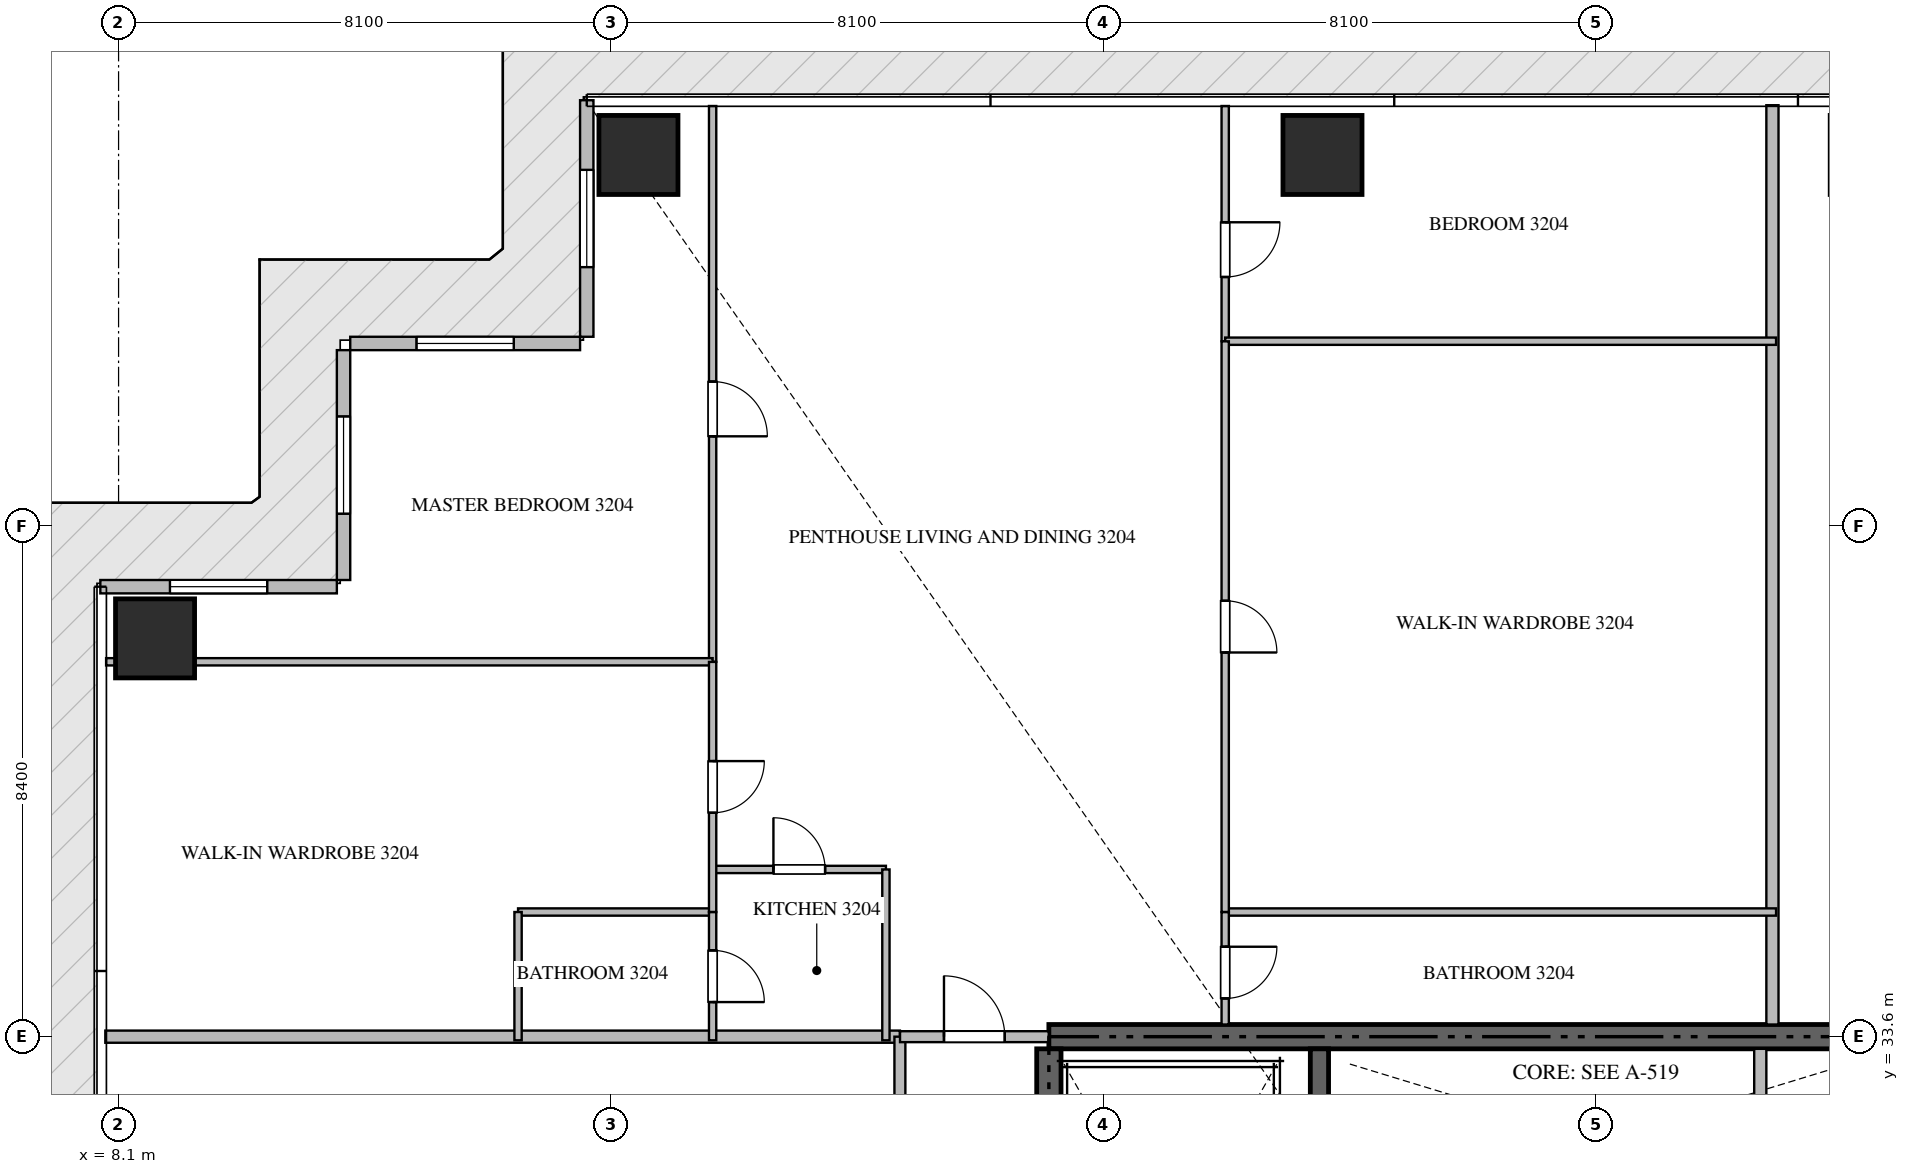
"""IFC4 building model, lengths in metres.
Left out: names, types, materials, properties, quantities, classifications, styles, units other than length and angle.
Written with IfcOpenShell. Run it as: python <this file> out.ifc"""

import sys

from ifc_helpers import new_model, si_unit, direction, frame, frame_2d, origin, origin_2d, place, context, subcontext, project, spatial, rectangle, extrude, source, transform, mapped, element, fill, save


model = new_model("IFC4")
c1 = context("Model", 3, precision=1e-05, world=origin(), true_north=direction((0.0, 1.0)))
c2 = subcontext(c1, "Body", "Model", "MODEL_VIEW")
j1 = project(units=[si_unit("LENGTHUNIT", "METRE"), si_unit("PLANEANGLEUNIT", "RADIAN")], contexts=[c1])
p1 = place(None, origin())
s1 = spatial("IfcSite", under=j1, at=p1, CompositionType="ELEMENT")
p2 = place(p1, origin())
s2 = spatial("IfcBuilding", under=s1, at=p2, CompositionType="ELEMENT")
p3 = place(p2, frame((0.0, 0.0, 131.4)))
s3 = spatial("IfcBuildingStorey", under=s2, at=p3, CompositionType="ELEMENT", Elevation=131.4)
p4 = place(p3, frame((41.4, 33.6, -0.26), z_axis=(0.0, 0.0, 1.0), x_axis=(-1.0, 0.0, 0.0)))
e1 = element("IfcWall", 1, at=p4, inside=s3, PredefinedType="SHEAR", context=c2, shape_type="SweptSolid", body=[
    extrude(rectangle(XDim=18.0, YDim=0.4, at=frame_2d((9.0, 0.0))), origin(), (0.0, 0.0, 1.0), 3.748),
])
p5 = place(p3, frame((23.4, 24.25, -0.26), z_axis=(0.0, 0.0, 1.0), x_axis=(0.0, 1.0, 0.0)))
e2 = element("IfcWall", 2, at=p5, inside=s3, PredefinedType="SHEAR", context=c2, shape_type="SweptSolid", body=[
    extrude(rectangle(XDim=9.15, YDim=0.4, at=frame_2d((4.575, 0.0))), origin(), (0.0, 0.0, 1.0), 3.748),
])
p6 = place(p3, frame((27.85, 23.55, -0.26), z_axis=(0.0, 0.0, 1.0), x_axis=(0.0, 1.0, 0.0)))
e3 = element("IfcWall", 3, at=p6, inside=s3, PredefinedType="SHEAR", context=c2, shape_type="SweptSolid", body=[
    extrude(rectangle(XDim=9.85, YDim=0.3, at=frame_2d((4.925, 0.0))), origin(), (0.0, 0.0, 1.0), 3.748),
])
m1 = source(origin(), c2, "Body", "SweptSolid", [
    extrude(rectangle(XDim=1.3, YDim=1.3, at=origin_2d()), origin(), (0.0, 0.0, 1.0), 3.75),
])
for number, where, z_axis, x_axis in (
    (4, (16.65, 48.1, -0.26), (0.0, 0.0, 1.0), (1.0, 0.0, 0.0)),
    (5, (27.9, 48.1, -0.26), (0.0, 0.0, 1.0), (1.0, 0.0, 0.0)),
    (6, (8.7, 40.15, -0.26), (0.0, 0.0, 1.0), (1.0, 0.0, 0.0)),
):
    element("IfcColumn", number, at=place(p3, frame(where, z_axis=z_axis, x_axis=x_axis)), inside=s3, PredefinedType="COLUMN", context=c2, shape_type="MappedRepresentation", body=[
        mapped(m1, transform((0.0, 0.0, 0.0), scale=1.0)),
    ])
p7 = place(p3, frame((15.8, 49.0, 0.0), z_axis=(0.0, 0.0, 1.0), x_axis=(0.0, -1.0, 0.0)))
e7 = element("IfcWall", 7, at=p7, inside=s3, PredefinedType="ELEMENTEDWALL", context=c2, shape_type="SweptSolid", body=[
    extrude(rectangle(XDim=3.89, YDim=0.22, at=frame_2d((1.945, 0.0))), origin(), (0.0, 0.0, 1.0), 3.475),
])
p8 = place(p7, frame((1.145, 0.0, 0.65)))
e8 = element("IfcOpeningElement", 8, at=p8, cuts=e7, PredefinedType="OPENING", context=c2, shape_type="SweptSolid", body=[
    extrude(rectangle(XDim=1.6, YDim=2.1, at=frame_2d((0.8, 1.05))), frame((0.0, 0.12, 0.0), z_axis=(0.0, -1.0, 0.0), x_axis=(1.0, 0.0, 0.0)), (0.0, 0.0, 1.0), 0.24),
])
p9 = place(p3, frame((15.69, 45.0, 0.0), z_axis=(0.0, 0.0, 1.0), x_axis=(-1.0, 0.0, 0.0)))
e9 = element("IfcWall", 9, at=p9, inside=s3, PredefinedType="ELEMENTEDWALL", context=c2, shape_type="SweptSolid", body=[
    extrude(rectangle(XDim=3.78, YDim=0.22, at=frame_2d((1.89, 0.0))), origin(), (0.0, 0.0, 1.0), 3.475),
])
p10 = place(p9, frame((1.09, 0.0, 0.65)))
e10 = element("IfcOpeningElement", 10, at=p10, cuts=e9, PredefinedType="OPENING", context=c2, shape_type="SweptSolid", body=[
    extrude(rectangle(XDim=1.6, YDim=2.1, at=frame_2d((0.8, 1.05))), frame((0.0, 0.12, 0.0), z_axis=(0.0, -1.0, 0.0), x_axis=(1.0, 0.0, 0.0)), (0.0, 0.0, 1.0), 0.24),
])
p11 = place(p3, frame((11.8, 44.89, 0.0), z_axis=(0.0, 0.0, 1.0), x_axis=(0.0, -1.0, 0.0)))
e11 = element("IfcWall", 11, at=p11, inside=s3, PredefinedType="ELEMENTEDWALL", context=c2, shape_type="SweptSolid", body=[
    extrude(rectangle(XDim=3.78, YDim=0.22, at=frame_2d((1.89, 0.0))), origin(), (0.0, 0.0, 1.0), 3.475),
])
p12 = place(p11, frame((1.09, 0.0, 0.65)))
e12 = element("IfcOpeningElement", 12, at=p12, cuts=e11, PredefinedType="OPENING", context=c2, shape_type="SweptSolid", body=[
    extrude(rectangle(XDim=1.6, YDim=2.1, at=frame_2d((0.8, 1.05))), frame((0.0, 0.12, 0.0), z_axis=(0.0, -1.0, 0.0), x_axis=(1.0, 0.0, 0.0)), (0.0, 0.0, 1.0), 0.24),
])
p13 = place(p3, frame((11.69, 41.0, 0.0), z_axis=(0.0, 0.0, 1.0), x_axis=(-1.0, 0.0, 0.0)))
e13 = element("IfcWall", 13, at=p13, inside=s3, PredefinedType="ELEMENTEDWALL", context=c2, shape_type="SweptSolid", body=[
    extrude(rectangle(XDim=3.89, YDim=0.22, at=frame_2d((1.945, 0.0))), origin(), (0.0, 0.0, 1.0), 3.475),
])
p14 = place(p13, frame((1.145, 0.0, 0.65)))
e14 = element("IfcOpeningElement", 14, at=p14, cuts=e13, PredefinedType="OPENING", context=c2, shape_type="SweptSolid", body=[
    extrude(rectangle(XDim=1.6, YDim=2.1, at=frame_2d((0.8, 1.05))), frame((0.0, 0.12, 0.0), z_axis=(0.0, -1.0, 0.0), x_axis=(1.0, 0.0, 0.0)), (0.0, 0.0, 1.0), 0.24),
])
p15 = place(p3, frame((35.1, 30.75, 0.0), z_axis=(0.0, 0.0, 1.0), x_axis=(0.0, 1.0, 0.0)))
e15 = element("IfcWall", 15, at=p15, inside=s3, PredefinedType="STANDARD", context=c2, shape_type="SweptSolid", body=[
    extrude(rectangle(XDim=2.65, YDim=0.2, at=frame_2d((1.325, 0.0))), origin(), (0.0, 0.0, 1.0), 3.49),
])
p16 = place(p3, frame((35.3, 33.8, 0.0), z_axis=(0.0, 0.0, 1.0), x_axis=(0.0, 1.0, 0.0)))
e16 = element("IfcWall", 16, at=p16, inside=s3, PredefinedType="PARTITIONING", context=c2, shape_type="SweptSolid", body=[
    extrude(rectangle(XDim=15.118, YDim=0.2, at=frame_2d((7.559, 0.0))), origin(), (0.0, 0.0, 1.0), 3.49),
])
p17 = place(p3, frame((7.882, 33.6, 0.0), z_axis=(0.0, 0.0, 1.0), x_axis=(1.0, 0.0, 0.0)))
e17 = element("IfcWall", 17, at=p17, inside=s3, PredefinedType="PARTITIONING", context=c2, shape_type="SweptSolid", body=[
    extrude(rectangle(XDim=13.068, YDim=0.2, at=frame_2d((6.534, 0.0))), origin(), (0.0, 0.0, 1.0), 3.49),
])
p18 = place(p3, frame((20.95, 14.9, 0.0), z_axis=(0.0, 0.0, 1.0), x_axis=(0.0, 1.0, 0.0)))
e18 = element("IfcWall", 18, at=p18, inside=s3, PredefinedType="PARTITIONING", context=c2, shape_type="SweptSolid", body=[
    extrude(rectangle(XDim=18.7, YDim=0.18, at=frame_2d((9.35, 0.0))), origin(), (0.0, 0.0, 1.0), 3.49),
])
p19 = place(p18, frame((1.805, 0.0, 0.0)))
e19 = element("IfcOpeningElement", 19, at=p19, cuts=e18, PredefinedType="OPENING", context=c2, shape_type="SweptSolid", body=[
    extrude(rectangle(XDim=1.0, YDim=2.15, at=frame_2d((0.5, 1.075))), frame((0.0, 0.1, 0.0), z_axis=(0.0, -1.0, 0.0), x_axis=(1.0, 0.0, 0.0)), (0.0, 0.0, 1.0), 0.2),
])
p20 = place(p18, frame((14.726, 0.0, 0.0)))
e20 = element("IfcOpeningElement", 20, at=p20, cuts=e18, PredefinedType="OPENING", context=c2, shape_type="SweptSolid", body=[
    extrude(rectangle(XDim=1.0, YDim=2.15, at=frame_2d((0.5, 1.075))), frame((0.0, 0.1, 0.0), z_axis=(0.0, -1.0, 0.0), x_axis=(1.0, 0.0, 0.0)), (0.0, 0.0, 1.0), 0.2),
])
p21 = place(p3, frame((20.952, 33.6, 0.0), z_axis=(0.0, 0.0, 1.0), x_axis=(1.0, 0.0, 0.0)))
e21 = element("IfcWall", 21, at=p21, inside=s3, PredefinedType="PARTITIONING", context=c2, shape_type="SweptSolid", body=[
    extrude(rectangle(XDim=2.446, YDim=0.18, at=frame_2d((1.223, 0.0))), origin(), (0.0, 0.0, 1.0), 3.49),
])
p22 = place(p21, frame((0.723, 0.0, 0.0)))
e22 = element("IfcOpeningElement", 22, at=p22, cuts=e21, PredefinedType="OPENING", context=c2, shape_type="SweptSolid", body=[
    extrude(rectangle(XDim=1.0, YDim=2.15, at=frame_2d((0.5, 1.075))), frame((0.0, 0.1, 0.0), z_axis=(0.0, -1.0, 0.0), x_axis=(1.0, 0.0, 0.0)), (0.0, 0.0, 1.0), 0.2),
])
p23 = place(p3, frame((17.87, 36.35, 0.0), z_axis=(0.0, 0.0, 1.0), x_axis=(1.0, 0.0, 0.0)))
e23 = element("IfcWall", 23, at=p23, inside=s3, PredefinedType="PARTITIONING", context=c2, shape_type="SweptSolid", body=[
    extrude(rectangle(XDim=2.85, YDim=0.12, at=frame_2d((1.425, 0.0))), origin(), (0.0, 0.0, 1.0), 3.49),
])
p24 = place(p23, frame((1.0, 0.0, 0.0)))
e24 = element("IfcOpeningElement", 24, at=p24, cuts=e23, PredefinedType="OPENING", context=c2, shape_type="SweptSolid", body=[
    extrude(rectangle(XDim=0.85, YDim=2.1, at=frame_2d((0.425, 1.05))), frame((0.0, 0.07, 0.0), z_axis=(0.0, -1.0, 0.0), x_axis=(1.0, 0.0, 0.0)), (0.0, 0.0, 1.0), 0.14),
])
p25 = place(p3, frame((20.72, 36.35, 0.0), z_axis=(0.0, 0.0, 1.0), x_axis=(0.0, -1.0, 0.0)))
e25 = element("IfcWall", 25, at=p25, inside=s3, PredefinedType="PARTITIONING", context=c2, shape_type="SweptSolid", body=[
    extrude(rectangle(XDim=2.81, YDim=0.12, at=frame_2d((1.405, 0.0))), origin(), (0.0, 0.0, 1.0), 3.49),
])
p26 = place(p3, frame((17.87, 48.905, 0.0), z_axis=(0.0, 0.0, 1.0), x_axis=(0.0, -1.0, 0.0)))
e26 = element("IfcWall", 26, at=p26, inside=s3, PredefinedType="PARTITIONING", context=c2, shape_type="SweptSolid", body=[
    extrude(rectangle(XDim=9.14, YDim=0.12, at=frame_2d((4.57, 0.0))), origin(), (0.0, 0.0, 1.0), 3.49),
])
p27 = place(p26, frame((4.532, 0.0, 0.0)))
e27 = element("IfcOpeningElement", 27, at=p27, cuts=e26, PredefinedType="OPENING", context=c2, shape_type="SweptSolid", body=[
    extrude(rectangle(XDim=0.9, YDim=2.1, at=frame_2d((0.45, 1.05))), frame((0.0, 0.07, 0.0), z_axis=(0.0, -1.0, 0.0), x_axis=(1.0, 0.0, 0.0)), (0.0, 0.0, 1.0), 0.14),
])
p28 = place(p3, frame((7.895, 39.765, 0.0), z_axis=(0.0, 0.0, 1.0), x_axis=(1.0, 0.0, 0.0)))
e28 = element("IfcWall", 28, at=p28, inside=s3, PredefinedType="PARTITIONING", context=c2, shape_type="SweptSolid", body=[
    extrude(rectangle(XDim=9.975, YDim=0.12, at=frame_2d((4.988, 0.0))), origin(), (0.0, 0.0, 1.0), 3.49),
])
p29 = place(p3, frame((14.67, 35.65, 0.0), z_axis=(0.0, 0.0, 1.0), x_axis=(1.0, 0.0, 0.0)))
e29 = element("IfcWall", 29, at=p29, inside=s3, PredefinedType="PARTITIONING", context=c2, shape_type="SweptSolid", body=[
    extrude(rectangle(XDim=3.2, YDim=0.12, at=frame_2d((1.6, 0.0))), origin(), (0.0, 0.0, 1.0), 3.49),
])
p30 = place(p3, frame((14.67, 35.65, 0.0), z_axis=(0.0, 0.0, 1.0), x_axis=(0.0, -1.0, 0.0)))
e30 = element("IfcWall", 30, at=p30, inside=s3, PredefinedType="PARTITIONING", context=c2, shape_type="SweptSolid", body=[
    extrude(rectangle(XDim=2.11, YDim=0.12, at=frame_2d((1.055, 0.0))), origin(), (0.0, 0.0, 1.0), 3.49),
])
p31 = place(p3, frame((17.87, 39.763, 0.0), z_axis=(0.0, 0.0, 1.0), x_axis=(0.0, -1.0, 0.0)))
e31 = element("IfcWall", 31, at=p31, inside=s3, PredefinedType="PARTITIONING", context=c2, shape_type="SweptSolid", body=[
    extrude(rectangle(XDim=4.113, YDim=0.12, at=frame_2d((2.057, 0.0))), origin(), (0.0, 0.0, 1.0), 3.49),
])
p32 = place(p31, frame((1.631, 0.0, 0.0)))
e32 = element("IfcOpeningElement", 32, at=p32, cuts=e31, PredefinedType="OPENING", context=c2, shape_type="SweptSolid", body=[
    extrude(rectangle(XDim=0.85, YDim=2.1, at=frame_2d((0.425, 1.05))), frame((0.0, 0.07, 0.0), z_axis=(0.0, -1.0, 0.0), x_axis=(1.0, 0.0, 0.0)), (0.0, 0.0, 1.0), 0.14),
])
p33 = place(p3, frame((17.87, 35.648, 0.0), z_axis=(0.0, 0.0, 1.0), x_axis=(0.0, -1.0, 0.0)))
e33 = element("IfcWall", 33, at=p33, inside=s3, PredefinedType="PARTITIONING", context=c2, shape_type="SweptSolid", body=[
    extrude(rectangle(XDim=2.108, YDim=0.12, at=frame_2d((1.054, 0.0))), origin(), (0.0, 0.0, 1.0), 3.49),
])
p34 = place(p33, frame((0.629, 0.0, 0.0)))
e34 = element("IfcOpeningElement", 34, at=p34, cuts=e33, PredefinedType="OPENING", context=c2, shape_type="SweptSolid", body=[
    extrude(rectangle(XDim=0.85, YDim=2.1, at=frame_2d((0.425, 1.05))), frame((0.0, 0.07, 0.0), z_axis=(0.0, -1.0, 0.0), x_axis=(1.0, 0.0, 0.0)), (0.0, 0.0, 1.0), 0.14),
])
p35 = place(p3, frame((26.3, 48.905, 0.0), z_axis=(0.0, 0.0, 1.0), x_axis=(0.0, -1.0, 0.0)))
e35 = element("IfcWall", 35, at=p35, inside=s3, PredefinedType="PARTITIONING", context=c2, shape_type="SweptSolid", body=[
    extrude(rectangle(XDim=3.868, YDim=0.12, at=frame_2d((1.934, 0.0))), origin(), (0.0, 0.0, 1.0), 3.49),
])
p36 = place(p35, frame((1.912, 0.0, 0.0)))
e36 = element("IfcOpeningElement", 36, at=p36, cuts=e35, PredefinedType="OPENING", context=c2, shape_type="SweptSolid", body=[
    extrude(rectangle(XDim=0.9, YDim=2.1, at=frame_2d((0.45, 1.05))), frame((0.0, 0.07, 0.0), z_axis=(0.0, -1.0, 0.0), x_axis=(1.0, 0.0, 0.0)), (0.0, 0.0, 1.0), 0.14),
])
for number, where, z_axis, x_axis in (
    (37, (26.3, 45.037, 0.0), (0.0, 0.0, 1.0), (1.0, 0.0, 0.0)),
    (38, (26.3, 35.65, 0.0), (0.0, 0.0, 1.0), (1.0, 0.0, 0.0)),
):
    element("IfcWall", number, at=place(p3, frame(where, z_axis=z_axis, x_axis=x_axis)), inside=s3, PredefinedType="PARTITIONING", context=c2, shape_type="SweptSolid", body=[
        extrude(rectangle(XDim=9.06, YDim=0.12, at=frame_2d((4.53, 0.0))), origin(), (0.0, 0.0, 1.0), 3.49),
    ])
p37 = place(p3, frame((26.3, 45.035, 0.0), z_axis=(0.0, 0.0, 1.0), x_axis=(0.0, -1.0, 0.0)))
e39 = element("IfcWall", 39, at=p37, inside=s3, PredefinedType="PARTITIONING", context=c2, shape_type="SweptSolid", body=[
    extrude(rectangle(XDim=9.385, YDim=0.12, at=frame_2d((4.692, 0.0))), origin(), (0.0, 0.0, 1.0), 3.49),
])
p38 = place(p37, frame((4.267, 0.0, 0.0)))
e40 = element("IfcOpeningElement", 40, at=p38, cuts=e39, PredefinedType="OPENING", context=c2, shape_type="SweptSolid", body=[
    extrude(rectangle(XDim=0.85, YDim=2.1, at=frame_2d((0.425, 1.05))), frame((0.0, 0.07, 0.0), z_axis=(0.0, -1.0, 0.0), x_axis=(1.0, 0.0, 0.0)), (0.0, 0.0, 1.0), 0.14),
])
p39 = place(p3, frame((26.3, 35.648, 0.0), z_axis=(0.0, 0.0, 1.0), x_axis=(0.0, -1.0, 0.0)))
e41 = element("IfcWall", 41, at=p39, inside=s3, PredefinedType="PARTITIONING", context=c2, shape_type="SweptSolid", body=[
    extrude(rectangle(XDim=1.848, YDim=0.12, at=frame_2d((0.924, 0.0))), origin(), (0.0, 0.0, 1.0), 3.49),
])
p40 = place(p39, frame((0.569, 0.0, 0.0)))
e42 = element("IfcOpeningElement", 42, at=p40, cuts=e41, PredefinedType="OPENING", context=c2, shape_type="SweptSolid", body=[
    extrude(rectangle(XDim=0.85, YDim=2.1, at=frame_2d((0.425, 1.05))), frame((0.0, 0.07, 0.0), z_axis=(0.0, -1.0, 0.0), x_axis=(1.0, 0.0, 0.0)), (0.0, 0.0, 1.0), 0.14),
])
m2 = source(origin(), c2, "Body", "SweptSolid", [
    extrude(rectangle(XDim=1.6, YDim=2.1, at=frame_2d((0.8, 1.05))), frame((0.0, 0.03, 0.0), z_axis=(0.0, -1.0, 0.0), x_axis=(1.0, 0.0, 0.0)), (0.0, 0.0, 1.0), 0.06),
])
p41 = place(p8, origin())
e43 = element("IfcWindow", 43, at=p41, inside=s3, PartitioningType="SINGLE_PANEL", PredefinedType="WINDOW", context=c2, shape_type="MappedRepresentation", body=[
    mapped(m2, transform((0.0, 0.0, 0.0), scale=1.0)),
])
fill(e8, e43)
p42 = place(p10, origin())
e44 = element("IfcWindow", 44, at=p42, inside=s3, PartitioningType="SINGLE_PANEL", PredefinedType="WINDOW", context=c2, shape_type="MappedRepresentation", body=[
    mapped(m2, transform((0.0, 0.0, 0.0), scale=1.0)),
])
fill(e10, e44)
p43 = place(p12, origin())
e45 = element("IfcWindow", 45, at=p43, inside=s3, PartitioningType="SINGLE_PANEL", PredefinedType="WINDOW", context=c2, shape_type="MappedRepresentation", body=[
    mapped(m2, transform((0.0, 0.0, 0.0), scale=1.0)),
])
fill(e12, e45)
p44 = place(p14, origin())
e46 = element("IfcWindow", 46, at=p44, inside=s3, PartitioningType="SINGLE_PANEL", PredefinedType="WINDOW", context=c2, shape_type="MappedRepresentation", body=[
    mapped(m2, transform((0.0, 0.0, 0.0), scale=1.0)),
])
fill(e14, e46)
m3 = source(origin(), c2, "Body", "SweptSolid", [
    extrude(rectangle(XDim=1.0, YDim=2.15, at=frame_2d((0.5, 1.075))), frame((0.0, 0.025, 0.0), z_axis=(0.0, -1.0, 0.0), x_axis=(1.0, 0.0, 0.0)), (0.0, 0.0, 1.0), 0.05),
])
p45 = place(p22, origin())
e47 = element("IfcDoor", 47, at=p45, inside=s3, OperationType="SINGLE_SWING_LEFT", PredefinedType="DOOR", context=c2, shape_type="MappedRepresentation", body=[
    mapped(m3, transform((0.0, 0.0, 0.0), scale=1.0)),
])
fill(e22, e47)
m4 = source(origin(), c2, "Body", "SweptSolid", [
    extrude(rectangle(XDim=0.85, YDim=2.1, at=frame_2d((0.425, 1.05))), frame((0.0, 0.025, 0.0), z_axis=(0.0, -1.0, 0.0), x_axis=(1.0, 0.0, 0.0)), (0.0, 0.0, 1.0), 0.05),
])
p46 = place(p24, origin())
e48 = element("IfcDoor", 48, at=p46, inside=s3, OperationType="SINGLE_SWING_LEFT", PredefinedType="DOOR", context=c2, shape_type="MappedRepresentation", body=[
    mapped(m4, transform((0.0, 0.0, 0.0), scale=1.0)),
])
fill(e24, e48)
m5 = source(origin(), c2, "Body", "SweptSolid", [
    extrude(rectangle(XDim=0.9, YDim=2.1, at=frame_2d((0.45, 1.05))), frame((0.0, 0.025, 0.0), z_axis=(0.0, -1.0, 0.0), x_axis=(1.0, 0.0, 0.0)), (0.0, 0.0, 1.0), 0.05),
])
p47 = place(p27, origin())
e49 = element("IfcDoor", 49, at=p47, inside=s3, OperationType="SINGLE_SWING_RIGHT", PredefinedType="DOOR", context=c2, shape_type="MappedRepresentation", body=[
    mapped(m5, transform((0.0, 0.0, 0.0), scale=1.0)),
])
fill(e27, e49)
p48 = place(p32, origin())
e50 = element("IfcDoor", 50, at=p48, inside=s3, OperationType="SINGLE_SWING_LEFT", PredefinedType="DOOR", context=c2, shape_type="MappedRepresentation", body=[
    mapped(m4, transform((0.0, 0.0, 0.0), scale=1.0)),
])
fill(e32, e50)
p49 = place(p34, origin())
e51 = element("IfcDoor", 51, at=p49, inside=s3, OperationType="SINGLE_SWING_RIGHT", PredefinedType="DOOR", context=c2, shape_type="MappedRepresentation", body=[
    mapped(m4, transform((0.0, 0.0, 0.0), scale=1.0)),
])
fill(e34, e51)
p50 = place(p36, origin())
e52 = element("IfcDoor", 52, at=p50, inside=s3, OperationType="SINGLE_SWING_LEFT", PredefinedType="DOOR", context=c2, shape_type="MappedRepresentation", body=[
    mapped(m5, transform((0.0, 0.0, 0.0), scale=1.0)),
])
fill(e36, e52)
p51 = place(p38, origin())
e53 = element("IfcDoor", 53, at=p51, inside=s3, OperationType="SINGLE_SWING_RIGHT", PredefinedType="DOOR", context=c2, shape_type="MappedRepresentation", body=[
    mapped(m4, transform((0.0, 0.0, 0.0), scale=1.0)),
])
fill(e40, e53)
p52 = place(p40, origin())
e54 = element("IfcDoor", 54, at=p52, inside=s3, OperationType="SINGLE_SWING_LEFT", PredefinedType="DOOR", context=c2, shape_type="MappedRepresentation", body=[
    mapped(m4, transform((0.0, 0.0, 0.0), scale=1.0)),
])
fill(e42, e54)
save(model, sys.argv[1])
